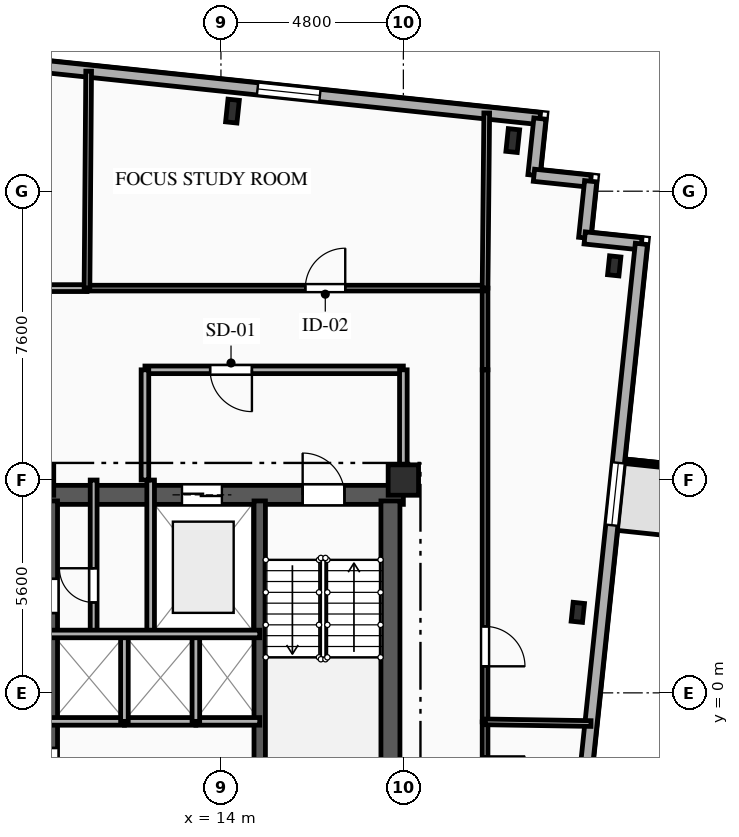
"""IFC4 building model, lengths in metres.
Left out: names, types, materials, properties, quantities, classifications, styles, units other than length and angle.
Written with IfcOpenShell. Run it as: python <this file> out.ifc"""

import sys

from ifc_helpers import new_model, si_unit, direction, frame, frame_2d, origin, origin_2d, place, context, subcontext, project, spatial, rectangle, i_section, extrude, element, fill, save


model = new_model("IFC4")
c1 = context("Model", 3, precision=1e-05, world=origin(), true_north=direction((0.0, 1.0)))
c2 = subcontext(c1, "Body", "Model", "MODEL_VIEW")
j1 = project(units=[si_unit("LENGTHUNIT", "METRE"), si_unit("PLANEANGLEUNIT", "RADIAN")], contexts=[c1])
p1 = place(None, origin())
s1 = spatial("IfcSite", under=j1, at=p1, CompositionType="ELEMENT")
p2 = place(p1, origin())
s2 = spatial("IfcBuilding", under=s1, at=p2, CompositionType="ELEMENT")
p3 = place(p2, frame((0.0, 0.0, 199.75)))
s3 = spatial("IfcBuildingStorey", under=s2, at=p3, CompositionType="ELEMENT", Elevation=199.75)
for number, where, z_axis, x_axis in (
    (1, (9.2, 5.6, 0.0), (0.0, 0.0, 1.0), (1.0, 0.0, 0.0)),
    (2, (18.8, 5.6, 0.0), (0.0, 0.0, 1.0), (1.0, 0.0, 0.0)),
):
    element("IfcColumn", number, at=place(p3, frame(where, z_axis=z_axis, x_axis=x_axis)), inside=s3, PredefinedType="COLUMN", context=c2, shape_type="SweptSolid", body=[
        extrude(rectangle(XDim=0.8, YDim=0.8, at=origin_2d()), origin(), (0.0, 0.0, 1.0), 3.35),
    ])
for number, where, z_axis, x_axis in (
    (3, (21.679, 14.532, 0.0), (0.0, 0.0, 1.0), (0.995, -0.105, 0.0)),
    (4, (14.303, 15.308, 0.0), (0.0, 0.0, 1.0), (0.995, -0.105, 0.0)),
):
    element("IfcColumn", number, at=place(p3, frame(where, z_axis=z_axis, x_axis=x_axis)), inside=s3, PredefinedType="COLUMN", context=c2, shape_type="SweptSolid", body=[
        extrude(i_section(OverallWidth=0.3, OverallDepth=0.6, WebThickness=0.015, FlangeThickness=0.03, FilletRadius=0.027, at=origin_2d()), origin(), (0.0, 0.0, 1.0), 3.35),
    ])
for number, where, z_axis, x_axis in (
    (5, (23.391, 2.119, 0.0), (0.0, 0.0, 1.0), (0.995, -0.105, 0.0)),
    (6, (24.349, 11.235, 0.0), (0.0, 0.0, 1.0), (0.995, -0.105, 0.0)),
):
    element("IfcColumn", number, at=place(p3, frame(where, z_axis=z_axis, x_axis=x_axis)), inside=s3, PredefinedType="COLUMN", context=c2, shape_type="SweptSolid", body=[
        extrude(i_section(OverallWidth=0.3, OverallDepth=0.5, WebThickness=0.014, FlangeThickness=0.028, FilletRadius=0.027, at=origin_2d()), origin(), (0.0, 0.0, 1.0), 3.35),
    ])
p4 = place(p3, frame((-23.156, 19.898, 0.0), z_axis=(0.0, 0.0, 1.0), x_axis=(0.994522001802, -0.104527450613, 0.0)))
e7 = element("IfcWall", 7, at=p4, inside=s3, PredefinedType="SOLIDWALL", context=c2, shape_type="SweptSolid", body=[
    extrude(rectangle(XDim=45.8, YDim=0.32, at=frame_2d((22.9, 0.0))), origin(), (0.0, 0.0, 1.0), 3.04),
])
p5 = place(p4, frame((4.139, 0.0, 0.85)))
e8 = element("IfcOpeningElement", 8, at=p5, cuts=e7, PredefinedType="OPENING", context=c2, shape_type="SweptSolid", body=[
    extrude(rectangle(XDim=1.65, YDim=1.85, at=frame_2d((0.825, 0.925))), frame((0.0, 0.17, 0.0), z_axis=(0.0, -1.0, 0.0), x_axis=(1.0, 0.0, 0.0)), (0.0, 0.0, 1.0), 0.34),
])
p6 = place(p4, frame((9.384, 0.0, 0.85)))
e9 = element("IfcOpeningElement", 9, at=p6, cuts=e7, PredefinedType="OPENING", context=c2, shape_type="SweptSolid", body=[
    extrude(rectangle(XDim=1.65, YDim=1.85, at=frame_2d((0.825, 0.925))), frame((0.0, 0.17, 0.0), z_axis=(0.0, -1.0, 0.0), x_axis=(1.0, 0.0, 0.0)), (0.0, 0.0, 1.0), 0.34),
])
p7 = place(p4, frame((18.547, 0.0, 0.85)))
e10 = element("IfcOpeningElement", 10, at=p7, cuts=e7, PredefinedType="OPENING", context=c2, shape_type="SweptSolid", body=[
    extrude(rectangle(XDim=1.5, YDim=1.85, at=frame_2d((0.75, 0.925))), frame((0.0, 0.17, 0.0), z_axis=(0.0, -1.0, 0.0), x_axis=(1.0, 0.0, 0.0)), (0.0, 0.0, 1.0), 0.34),
])
p8 = place(p4, frame((27.525, 0.0, 0.85)))
e11 = element("IfcOpeningElement", 11, at=p8, cuts=e7, PredefinedType="OPENING", context=c2, shape_type="SweptSolid", body=[
    extrude(rectangle(XDim=2.2, YDim=1.85, at=frame_2d((1.1, 0.925))), frame((0.0, 0.17, 0.0), z_axis=(0.0, -1.0, 0.0), x_axis=(1.0, 0.0, 0.0)), (0.0, 0.0, 1.0), 0.34),
])
p9 = place(p4, frame((38.329, 0.0, 0.85)))
e12 = element("IfcOpeningElement", 12, at=p9, cuts=e7, PredefinedType="OPENING", context=c2, shape_type="SweptSolid", body=[
    extrude(rectangle(XDim=1.65, YDim=1.85, at=frame_2d((0.825, 0.925))), frame((0.0, 0.17, 0.0), z_axis=(0.0, -1.0, 0.0), x_axis=(1.0, 0.0, 0.0)), (0.0, 0.0, 1.0), 0.34),
])
p10 = place(p3, frame((22.393, 15.111, 0.0), z_axis=(0.0, 0.0, 1.0), x_axis=(-0.104481464157, -0.994526834051, 0.0)))
e13 = element("IfcWall", 13, at=p10, inside=s3, PredefinedType="SOLIDWALL", context=c2, shape_type="SweptSolid", body=[
    extrude(rectangle(XDim=1.5, YDim=0.32, at=frame_2d((0.75, 0.0))), origin(), (0.0, 0.0, 1.0), 3.04),
])
for number, where, z_axis, x_axis in (
    (14, (22.237, 13.619, 0.0), (0.0, 0.0, 1.0), (0.995, -0.104, 0.0)),
    (15, (23.728, 13.462, 0.0), (0.0, 0.0, 1.0), (-0.104, -0.995, 0.0)),
    (16, (23.572, 11.971, 0.0), (0.0, 0.0, 1.0), (0.995, -0.105, 0.0)),
):
    element("IfcWall", number, at=place(p3, frame(where, z_axis=z_axis, x_axis=x_axis)), inside=s3, PredefinedType="SOLIDWALL", context=c2, shape_type="SweptSolid", body=[
        extrude(rectangle(XDim=1.5, YDim=0.32, at=frame_2d((0.75, 0.0))), origin(), (0.0, 0.0, 1.0), 3.04),
    ])
p11 = place(p3, frame((25.063, 11.814, 0.0), z_axis=(0.0, 0.0, 1.0), x_axis=(-0.104523275986, -0.99452244056, 0.0)))
e17 = element("IfcWall", 17, at=p11, inside=s3, PredefinedType="SOLIDWALL", context=c2, shape_type="SweptSolid", body=[
    extrude(rectangle(XDim=28.8, YDim=0.32, at=frame_2d((14.4, 0.0))), origin(), (0.0, 0.0, 1.0), 3.04),
])
p12 = place(p11, frame((5.793, 0.0, 0.85)))
e18 = element("IfcOpeningElement", 18, at=p12, cuts=e17, PredefinedType="OPENING", context=c2, shape_type="SweptSolid", body=[
    extrude(rectangle(XDim=1.65, YDim=1.85, at=frame_2d((0.825, 0.925))), frame((0.0, 0.17, 0.0), z_axis=(0.0, -1.0, 0.0), x_axis=(1.0, 0.0, 0.0)), (0.0, 0.0, 1.0), 0.34),
])
p13 = place(p11, frame((19.752, 0.0, 0.85)))
e19 = element("IfcOpeningElement", 19, at=p13, cuts=e17, PredefinedType="OPENING", context=c2, shape_type="SweptSolid", body=[
    extrude(rectangle(XDim=1.65, YDim=1.85, at=frame_2d((0.825, 0.925))), frame((0.0, 0.17, 0.0), z_axis=(0.0, -1.0, 0.0), x_axis=(1.0, 0.0, 0.0)), (0.0, 0.0, 1.0), 0.34),
])
p14 = place(p3, frame((9.2, 5.21, 0.0), z_axis=(0.0, 0.0, 1.0), x_axis=(1.0, 0.0, 0.0)))
e20 = element("IfcWall", 20, at=p14, inside=s3, PredefinedType="SHEAR", context=c2, shape_type="SweptSolid", body=[
    extrude(rectangle(XDim=9.6, YDim=0.5, at=frame_2d((4.8, 0.0))), origin(), (0.0, 0.0, 1.0), 3.04),
])
p15 = place(p14, frame((6.95, 0.0, 0.0)))
e21 = element("IfcOpeningElement", 21, at=p15, cuts=e20, PredefinedType="OPENING", context=c2, shape_type="SweptSolid", body=[
    extrude(rectangle(XDim=1.1, YDim=2.15, at=frame_2d((0.55, 1.075))), frame((0.0, 0.26, 0.0), z_axis=(0.0, -1.0, 0.0), x_axis=(1.0, 0.0, 0.0)), (0.0, 0.0, 1.0), 0.52),
])
p16 = place(p14, frame((3.775, 0.0, 0.0)))
e22 = element("IfcOpeningElement", 22, at=p16, cuts=e20, PredefinedType="OPENING", context=c2, shape_type="SweptSolid", body=[
    extrude(rectangle(XDim=1.05, YDim=2.1, at=frame_2d((0.525, 1.05))), frame((0.0, 0.26, 0.0), z_axis=(0.0, -1.0, 0.0), x_axis=(1.0, 0.0, 0.0)), (0.0, 0.0, 1.0), 0.52),
])
p17 = place(p3, frame((9.45, -5.05, 0.0), z_axis=(0.0, 0.0, 1.0), x_axis=(0.0, 1.0, 0.0)))
e23 = element("IfcWall", 23, at=p17, inside=s3, PredefinedType="SHEAR", context=c2, shape_type="SweptSolid", body=[
    extrude(rectangle(XDim=10.1, YDim=0.5, at=frame_2d((5.05, 0.0))), origin(), (0.0, 0.0, 1.0), 3.04),
])
p18 = place(p17, frame((7.15, 0.0, 0.0)))
e24 = element("IfcOpeningElement", 24, at=p18, cuts=e23, PredefinedType="OPENING", context=c2, shape_type="SweptSolid", body=[
    extrude(rectangle(XDim=0.9, YDim=2.1, at=frame_2d((0.45, 1.05))), frame((0.0, 0.26, 0.0), z_axis=(0.0, -1.0, 0.0), x_axis=(1.0, 0.0, 0.0)), (0.0, 0.0, 1.0), 0.52),
])
p19 = place(p17, frame((2.4, 0.0, 0.0)))
e25 = element("IfcOpeningElement", 25, at=p19, cuts=e23, PredefinedType="OPENING", context=c2, shape_type="SweptSolid", body=[
    extrude(rectangle(XDim=1.2, YDim=2.15, at=frame_2d((0.6, 1.075))), frame((0.0, 0.26, 0.0), z_axis=(0.0, -1.0, 0.0), x_axis=(1.0, 0.0, 0.0)), (0.0, 0.0, 1.0), 0.52),
])
p20 = place(p3, frame((18.46, -5.05, 0.0), z_axis=(0.0, 0.0, 1.0), x_axis=(0.0, 1.0, 0.0)))
e26 = element("IfcWall", 26, at=p20, inside=s3, PredefinedType="SHEAR", context=c2, shape_type="SweptSolid", body=[
    extrude(rectangle(XDim=10.1, YDim=0.5, at=frame_2d((5.05, 0.0))), origin(), (0.0, 0.0, 1.0), 3.04),
])
p21 = place(p3, frame((15.02, -5.05, 0.0), z_axis=(0.0, 0.0, 1.0), x_axis=(0.0, 1.0, 0.0)))
e27 = element("IfcWall", 27, at=p21, inside=s3, PredefinedType="SHEAR", context=c2, shape_type="SweptSolid", body=[
    extrude(rectangle(XDim=10.1, YDim=0.3, at=frame_2d((5.05, 0.0))), origin(), (0.0, 0.0, 1.0), 3.04),
])
p22 = place(p3, frame((12.15, 5.6, 0.0), z_axis=(0.0, 0.0, 1.0), x_axis=(0.0, -1.0, 0.0)))
e28 = element("IfcWall", 28, at=p22, inside=s3, PredefinedType="PARTITIONING", context=c2, shape_type="SweptSolid", body=[
    extrude(rectangle(XDim=4.05, YDim=0.2, at=frame_2d((2.025, 0.0))), origin(), (0.0, 0.0, 1.0), 3.04),
])
p23 = place(p3, frame((18.8, 8.5, 0.0), z_axis=(0.0, 0.0, 1.0), x_axis=(-1.0, 0.0, 0.0)))
e29 = element("IfcWall", 29, at=p23, inside=s3, PredefinedType="PARTITIONING", context=c2, shape_type="SweptSolid", body=[
    extrude(rectangle(XDim=6.8, YDim=0.2, at=frame_2d((3.4, 0.0))), origin(), (0.0, 0.0, 1.0), 3.04),
])
p24 = place(p23, frame((3.985, 0.0, 0.0)))
e30 = element("IfcOpeningElement", 30, at=p24, cuts=e29, PredefinedType="OPENING", context=c2, shape_type="SweptSolid", body=[
    extrude(rectangle(XDim=1.1, YDim=2.15, at=frame_2d((0.55, 1.075))), frame((0.0, 0.11, 0.0), z_axis=(0.0, -1.0, 0.0), x_axis=(1.0, 0.0, 0.0)), (0.0, 0.0, 1.0), 0.22),
])
p25 = place(p3, frame((18.8, 5.6, 0.0), z_axis=(0.0, 0.0, 1.0), x_axis=(0.0, 1.0, 0.0)))
e31 = element("IfcWall", 31, at=p25, inside=s3, PredefinedType="PARTITIONING", context=c2, shape_type="SweptSolid", body=[
    extrude(rectangle(XDim=2.9, YDim=0.2, at=frame_2d((1.45, 0.0))), origin(), (0.0, 0.0, 1.0), 2.665),
])
p26 = place(p3, frame((12.0, 8.5, 0.0), z_axis=(0.0, 0.0, 1.0), x_axis=(0.0, -1.0, 0.0)))
e32 = element("IfcWall", 32, at=p26, inside=s3, PredefinedType="PARTITIONING", context=c2, shape_type="SweptSolid", body=[
    extrude(rectangle(XDim=2.9, YDim=0.2, at=frame_2d((1.45, 0.0))), origin(), (0.0, 0.0, 1.0), 3.04),
])
p27 = place(p3, frame((10.65, 1.55, 0.0), z_axis=(0.0, 0.0, 1.0), x_axis=(0.0, 1.0, 0.0)))
e33 = element("IfcWall", 33, at=p27, inside=s3, PredefinedType="PARTITIONING", context=c2, shape_type="SweptSolid", body=[
    extrude(rectangle(XDim=4.05, YDim=0.18, at=frame_2d((2.025, 0.0))), origin(), (0.0, 0.0, 1.0), 3.04),
])
p28 = place(p27, frame((0.829, 0.0, 0.0)))
e34 = element("IfcOpeningElement", 34, at=p28, cuts=e33, PredefinedType="OPENING", context=c2, shape_type="SweptSolid", body=[
    extrude(rectangle(XDim=0.9, YDim=2.1, at=frame_2d((0.45, 1.05))), frame((0.0, 0.1, 0.0), z_axis=(0.0, -1.0, 0.0), x_axis=(1.0, 0.0, 0.0)), (0.0, 0.0, 1.0), 0.2),
])
p29 = place(p3, frame((11.46, -0.75, 0.0), z_axis=(0.0, 0.0, 1.0), x_axis=(-1.0, 0.0, 0.0)))
e35 = element("IfcWall", 35, at=p29, inside=s3, PredefinedType="PARTITIONING", context=c2, shape_type="SweptSolid", body=[
    extrude(rectangle(XDim=2.26, YDim=0.2, at=frame_2d((1.13, 0.0))), origin(), (0.0, 0.0, 1.0), 3.04),
])
p30 = place(p3, frame((13.34, -0.75, 0.0), z_axis=(0.0, 0.0, 1.0), x_axis=(-1.0, 0.0, 0.0)))
e36 = element("IfcWall", 36, at=p30, inside=s3, PredefinedType="PARTITIONING", context=c2, shape_type="SweptSolid", body=[
    extrude(rectangle(XDim=1.88, YDim=0.2, at=frame_2d((0.94, 0.0))), origin(), (0.0, 0.0, 1.0), 3.04),
])
p31 = place(p3, frame((15.02, -0.75, 0.0), z_axis=(0.0, 0.0, 1.0), x_axis=(-1.0, 0.0, 0.0)))
e37 = element("IfcWall", 37, at=p31, inside=s3, PredefinedType="PARTITIONING", context=c2, shape_type="SweptSolid", body=[
    extrude(rectangle(XDim=1.68, YDim=0.2, at=frame_2d((0.84, 0.0))), origin(), (0.0, 0.0, 1.0), 3.04),
])
for number, where, z_axis, x_axis in (
    (38, (11.46, -0.75, 0.0), (0.0, 0.0, 1.0), (0.0, 1.0, 0.0)),
    (39, (13.34, -0.75, 0.0), (0.0, 0.0, 1.0), (0.0, 1.0, 0.0)),
):
    element("IfcWall", number, at=place(p3, frame(where, z_axis=z_axis, x_axis=x_axis)), inside=s3, PredefinedType="PARTITIONING", context=c2, shape_type="SweptSolid", body=[
        extrude(rectangle(XDim=2.3, YDim=0.2, at=frame_2d((1.15, 0.0))), origin(), (0.0, 0.0, 1.0), 3.04),
    ])
p32 = place(p3, frame((20.95, 10.65, 0.0), z_axis=(0.0, 0.0, 1.0), x_axis=(0.0, -1.0, 0.0)))
e40 = element("IfcWall", 40, at=p32, inside=s3, PredefinedType="PARTITIONING", context=c2, shape_type="SweptSolid", body=[
    extrude(rectangle(XDim=2.15, YDim=0.15, at=frame_2d((1.075, 0.0))), origin(), (0.0, 0.0, 1.0), 3.04),
])
p33 = place(p3, frame((2.45, 10.65, 0.0), z_axis=(0.0, 0.0, 1.0), x_axis=(1.0, 0.0, 0.0)))
e41 = element("IfcWall", 41, at=p33, inside=s3, PredefinedType="PARTITIONING", context=c2, shape_type="SweptSolid", body=[
    extrude(rectangle(XDim=8.025, YDim=0.18, at=frame_2d((4.013, 0.0))), origin(), (0.0, 0.0, 1.0), 3.04),
])
p34 = place(p33, frame((1.313, 0.0, 0.0)))
e42 = element("IfcOpeningElement", 42, at=p34, cuts=e41, PredefinedType="OPENING", context=c2, shape_type="SweptSolid", body=[
    extrude(rectangle(XDim=1.0, YDim=2.15, at=frame_2d((0.5, 1.075))), frame((0.0, 0.1, 0.0), z_axis=(0.0, -1.0, 0.0), x_axis=(1.0, 0.0, 0.0)), (0.0, 0.0, 1.0), 0.2),
])
p35 = place(p3, frame((10.475, 10.65, 0.0), z_axis=(0.0, 0.0, 1.0), x_axis=(1.0, 0.0, 0.0)))
e43 = element("IfcWall", 43, at=p35, inside=s3, PredefinedType="PARTITIONING", context=c2, shape_type="SweptSolid", body=[
    extrude(rectangle(XDim=10.475, YDim=0.15, at=frame_2d((5.237, 0.0))), origin(), (0.0, 0.0, 1.0), 3.04),
])
p36 = place(p35, frame((5.746, 0.0, 0.0)))
e44 = element("IfcOpeningElement", 44, at=p36, cuts=e43, PredefinedType="OPENING", context=c2, shape_type="SweptSolid", body=[
    extrude(rectangle(XDim=1.05, YDim=2.15, at=frame_2d((0.525, 1.075))), frame((0.0, 0.085, 0.0), z_axis=(0.0, -1.0, 0.0), x_axis=(1.0, 0.0, 0.0)), (0.0, 0.0, 1.0), 0.17),
])
p37 = place(p3, frame((20.95, -0.763, 0.0), z_axis=(0.0, 0.0, 1.0), x_axis=(0.0, -1.0, 0.0)))
e45 = element("IfcWall", 45, at=p37, inside=s3, PredefinedType="PARTITIONING", context=c2, shape_type="SweptSolid", body=[
    extrude(rectangle(XDim=4.837, YDim=0.15, at=frame_2d((2.418, 0.0))), origin(), (0.0, 0.0, 1.0), 2.695),
])
p38 = place(p37, frame((0.908, 0.0, 0.0)))
e46 = element("IfcOpeningElement", 46, at=p38, cuts=e45, PredefinedType="OPENING", context=c2, shape_type="SweptSolid", body=[
    extrude(rectangle(XDim=1.05, YDim=2.15, at=frame_2d((0.525, 1.075))), frame((0.0, 0.085, 0.0), z_axis=(0.0, -1.0, 0.0), x_axis=(1.0, 0.0, 0.0)), (0.0, 0.0, 1.0), 0.17),
])
p39 = place(p3, frame((20.95, 8.5, 0.0), z_axis=(0.0, 0.0, 1.0), x_axis=(0.0, -1.0, 0.0)))
e47 = element("IfcWall", 47, at=p39, inside=s3, PredefinedType="PARTITIONING", context=c2, shape_type="SweptSolid", body=[
    extrude(rectangle(XDim=9.263, YDim=0.15, at=frame_2d((4.632, 0.0))), origin(), (0.0, 0.0, 1.0), 2.695),
])
p40 = place(p39, frame((6.751, 0.0, 0.0)))
e48 = element("IfcOpeningElement", 48, at=p40, cuts=e47, PredefinedType="OPENING", context=c2, shape_type="SweptSolid", body=[
    extrude(rectangle(XDim=1.05, YDim=2.15, at=frame_2d((0.525, 1.075))), frame((0.0, 0.085, 0.0), z_axis=(0.0, -1.0, 0.0), x_axis=(1.0, 0.0, 0.0)), (0.0, 0.0, 1.0), 0.17),
])
p41 = place(p3, frame((20.95, -0.763, 0.0), z_axis=(0.0, 0.0, 1.0), x_axis=(0.999875696831, -0.015766765259, 0.0)))
e49 = element("IfcWall", 49, at=p41, inside=s3, PredefinedType="PARTITIONING", context=c2, shape_type="SweptSolid", body=[
    extrude(rectangle(XDim=2.787, YDim=0.15, at=frame_2d((1.394, 0.0))), origin(), (0.0, 0.0, 1.0), 3.04),
])
p42 = place(p3, frame((20.95, 10.65, 0.0), z_axis=(0.0, 0.0, 1.0), x_axis=(0.009535990233, 0.999954531411, 0.0)))
e50 = element("IfcWall", 50, at=p42, inside=s3, PredefinedType="PARTITIONING", context=c2, shape_type="SweptSolid", body=[
    extrude(rectangle(XDim=4.608, YDim=0.15, at=frame_2d((2.304, 0.0))), origin(), (0.0, 0.0, 1.0), 2.665),
])
p43 = place(p3, frame((10.519, 16.359, 0.0), z_axis=(0.0, 0.0, 1.0), x_axis=(-0.007654255135, -0.99997070576, 0.0)))
e51 = element("IfcWall", 51, at=p43, inside=s3, PredefinedType="PARTITIONING", context=c2, shape_type="SweptSolid", body=[
    extrude(rectangle(XDim=5.709, YDim=0.15, at=frame_2d((2.855, 0.0))), origin(), (0.0, 0.0, 1.0), 3.04),
])
p44 = place(p3, frame((9.2, 1.55, 0.0), z_axis=(0.0, 0.0, 1.0), x_axis=(1.0, 0.0, 0.0)))
e52 = element("IfcWall", 52, at=p44, inside=s3, PredefinedType="PARTITIONING", context=c2, shape_type="SweptSolid", body=[
    extrude(rectangle(XDim=5.82, YDim=0.2, at=frame_2d((2.91, 0.0))), origin(), (0.0, 0.0, 1.0), 3.04),
])
p45 = place(p9, origin())
e53 = element("IfcWindow", 53, at=p45, inside=s3, PartitioningType="SINGLE_PANEL", PredefinedType="WINDOW", context=c2, shape_type="SweptSolid", body=[
    extrude(rectangle(XDim=1.65, YDim=1.85, at=frame_2d((0.825, 0.925))), frame((0.0, 0.03, 0.0), z_axis=(0.0, -1.0, 0.0), x_axis=(1.0, 0.0, 0.0)), (0.0, 0.0, 1.0), 0.06),
])
fill(e12, e53)
p46 = place(p12, origin())
e54 = element("IfcWindow", 54, at=p46, inside=s3, PartitioningType="SINGLE_PANEL", PredefinedType="WINDOW", context=c2, shape_type="SweptSolid", body=[
    extrude(rectangle(XDim=1.65, YDim=1.85, at=frame_2d((0.825, 0.925))), frame((0.0, 0.03, 0.0), z_axis=(0.0, -1.0, 0.0), x_axis=(1.0, 0.0, 0.0)), (0.0, 0.0, 1.0), 0.06),
])
fill(e18, e54)
p47 = place(p15, origin())
e55 = element("IfcDoor", 55, at=p47, inside=s3, OperationType="SINGLE_SWING_LEFT", PredefinedType="DOOR", context=c2, shape_type="SweptSolid", body=[
    extrude(rectangle(XDim=1.1, YDim=2.15, at=frame_2d((0.55, 1.075))), frame((0.0, 0.025, 0.0), z_axis=(0.0, -1.0, 0.0), x_axis=(1.0, 0.0, 0.0)), (0.0, 0.0, 1.0), 0.05),
])
fill(e21, e55)
p48 = place(p16, origin())
e56 = element("IfcDoor", 56, at=p48, inside=s3, OperationType="DOUBLE_DOOR_SLIDING", PredefinedType="DOOR", context=c2, shape_type="SweptSolid", body=[
    extrude(rectangle(XDim=1.05, YDim=2.1, at=frame_2d((0.525, 1.05))), frame((0.0, 0.025, 0.0), z_axis=(0.0, -1.0, 0.0), x_axis=(1.0, 0.0, 0.0)), (0.0, 0.0, 1.0), 0.05),
])
fill(e22, e56)
p49 = place(p24, origin())
e57 = element("IfcDoor", 57, at=p49, inside=s3, OperationType="SINGLE_SWING_LEFT", PredefinedType="DOOR", context=c2, shape_type="SweptSolid", body=[
    extrude(rectangle(XDim=1.1, YDim=2.15, at=frame_2d((0.55, 1.075))), frame((0.0, 0.025, 0.0), z_axis=(0.0, -1.0, 0.0), x_axis=(1.0, 0.0, 0.0)), (0.0, 0.0, 1.0), 0.05),
])
fill(e30, e57)
p50 = place(p28, origin())
e58 = element("IfcDoor", 58, at=p50, inside=s3, OperationType="SINGLE_SWING_RIGHT", PredefinedType="DOOR", context=c2, shape_type="SweptSolid", body=[
    extrude(rectangle(XDim=0.9, YDim=2.1, at=frame_2d((0.45, 1.05))), frame((0.0, 0.025, 0.0), z_axis=(0.0, -1.0, 0.0), x_axis=(1.0, 0.0, 0.0)), (0.0, 0.0, 1.0), 0.05),
])
fill(e34, e58)
p51 = place(p36, origin())
e59 = element("IfcDoor", 59, at=p51, inside=s3, OperationType="SINGLE_SWING_RIGHT", PredefinedType="DOOR", context=c2, shape_type="SweptSolid", body=[
    extrude(rectangle(XDim=1.05, YDim=2.15, at=frame_2d((0.525, 1.075))), frame((0.0, 0.025, 0.0), z_axis=(0.0, -1.0, 0.0), x_axis=(1.0, 0.0, 0.0)), (0.0, 0.0, 1.0), 0.05),
])
fill(e44, e59)
p52 = place(p38, origin())
e60 = element("IfcDoor", 60, at=p52, inside=s3, OperationType="SINGLE_SWING_LEFT", PredefinedType="DOOR", context=c2, shape_type="SweptSolid", body=[
    extrude(rectangle(XDim=1.05, YDim=2.15, at=frame_2d((0.525, 1.075))), frame((0.0, 0.025, 0.0), z_axis=(0.0, -1.0, 0.0), x_axis=(1.0, 0.0, 0.0)), (0.0, 0.0, 1.0), 0.05),
])
fill(e46, e60)
p53 = place(p40, origin())
e61 = element("IfcDoor", 61, at=p53, inside=s3, OperationType="SINGLE_SWING_RIGHT", PredefinedType="DOOR", context=c2, shape_type="SweptSolid", body=[
    extrude(rectangle(XDim=1.05, YDim=2.15, at=frame_2d((0.525, 1.075))), frame((0.0, 0.025, 0.0), z_axis=(0.0, -1.0, 0.0), x_axis=(1.0, 0.0, 0.0)), (0.0, 0.0, 1.0), 0.05),
])
fill(e48, e61)
save(model, sys.argv[1])
